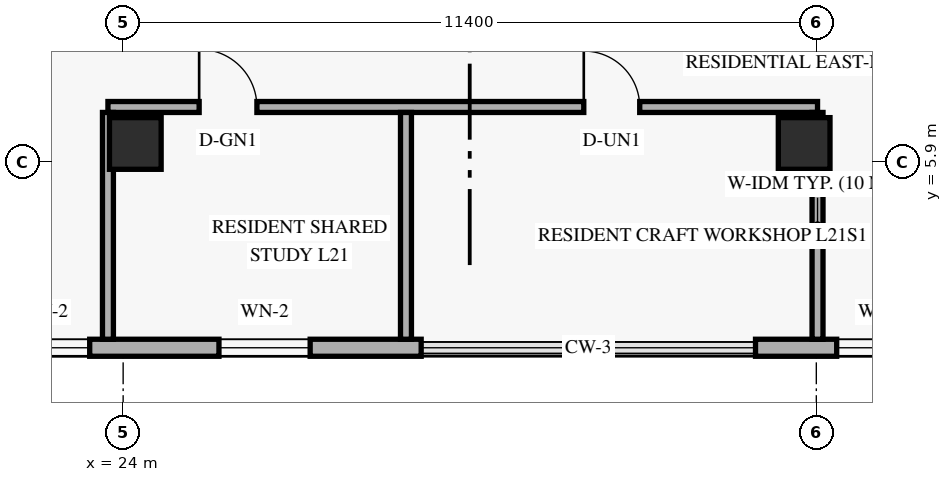
"""IFC4 building model, lengths in metres.
Left out: names, types, materials, properties, quantities, classifications, styles, units other than length and angle.
Written with IfcOpenShell. Run it as: python <this file> out.ifc"""

import sys

from ifc_helpers import new_model, si_unit, direction, frame, frame_2d, origin, origin_2d, place, context, subcontext, project, spatial, rectangle, extrude, element, fill, save


model = new_model("IFC4")
c1 = context("Model", 3, precision=1e-05, world=origin(), true_north=direction((0.0, 1.0)))
c2 = subcontext(c1, "Body", "Model", "MODEL_VIEW")
j1 = project(units=[si_unit("LENGTHUNIT", "METRE"), si_unit("PLANEANGLEUNIT", "RADIAN")], contexts=[c1])
p1 = place(None, origin())
s1 = spatial("IfcSite", under=j1, at=p1, CompositionType="ELEMENT")
p2 = place(p1, origin())
s2 = spatial("IfcBuilding", under=s1, at=p2, CompositionType="ELEMENT")
p3 = place(p2, frame((0.0, 0.0, 84.0)))
s3 = spatial("IfcBuildingStorey", under=s2, at=p3, CompositionType="ELEMENT", Elevation=84.0)
for number, where, z_axis, x_axis in (
    (1, (24.2, 6.2, 0.0), (0.0, 0.0, 1.0), (1.0, 0.0, 0.0)),
    (2, (35.2, 6.2, 0.0), (0.0, 0.0, 1.0), (1.0, 0.0, 0.0)),
):
    element("IfcColumn", number, at=place(p3, frame(where, z_axis=z_axis, x_axis=x_axis)), inside=s3, PredefinedType="COLUMN", context=c2, shape_type="SweptSolid", body=[
        extrude(rectangle(XDim=0.85, YDim=0.85, at=origin_2d()), origin(), (0.0, 0.0, 1.0), 3.6),
    ])
p4 = place(p3, frame((13.42, 2.84, 0.0), z_axis=(0.0, 0.0, 1.0), x_axis=(1.0, 0.0, 0.0)))
e3 = element("IfcWall", 3, at=p4, inside=s3, PredefinedType="SOLIDWALL", context=c2, shape_type="SweptSolid", body=[
    extrude(rectangle(XDim=15.481, YDim=0.28, at=frame_2d((7.741, 0.0))), origin(), (0.0, 0.0, 1.0), 3.36),
])
p5 = place(p4, frame((3.365, 0.0, 0.85)))
e4 = element("IfcOpeningElement", 4, at=p5, cuts=e3, PredefinedType="OPENING", context=c2, shape_type="SweptSolid", body=[
    extrude(rectangle(XDim=1.5, YDim=1.55, at=frame_2d((0.75, 0.775))), frame((0.0, 0.15, 0.0), z_axis=(0.0, -1.0, 0.0), x_axis=(1.0, 0.0, 0.0)), (0.0, 0.0, 1.0), 0.3),
])
p6 = place(p4, frame((8.53, 0.0, 0.85)))
e5 = element("IfcOpeningElement", 5, at=p6, cuts=e3, PredefinedType="OPENING", context=c2, shape_type="SweptSolid", body=[
    extrude(rectangle(XDim=1.5, YDim=1.55, at=frame_2d((0.75, 0.775))), frame((0.0, 0.15, 0.0), z_axis=(0.0, -1.0, 0.0), x_axis=(1.0, 0.0, 0.0)), (0.0, 0.0, 1.0), 0.3),
])
p7 = place(p4, frame((12.156, 0.0, 0.85)))
e6 = element("IfcOpeningElement", 6, at=p7, cuts=e3, PredefinedType="OPENING", context=c2, shape_type="SweptSolid", body=[
    extrude(rectangle(XDim=1.5, YDim=1.55, at=frame_2d((0.75, 0.775))), frame((0.0, 0.15, 0.0), z_axis=(0.0, -1.0, 0.0), x_axis=(1.0, 0.0, 0.0)), (0.0, 0.0, 1.0), 0.3),
])
p8 = place(p3, frame((34.4, 2.84, 0.0), z_axis=(0.0, 0.0, 1.0), x_axis=(1.0, 0.0, 0.0)))
e7 = element("IfcWall", 7, at=p8, inside=s3, PredefinedType="SOLIDWALL", context=c2, shape_type="SweptSolid", body=[
    extrude(rectangle(XDim=15.58, YDim=0.28, at=frame_2d((7.79, 0.0))), origin(), (0.0, 0.0, 1.0), 3.36),
])
p9 = place(p8, frame((1.335, 0.0, 0.85)))
e8 = element("IfcOpeningElement", 8, at=p9, cuts=e7, PredefinedType="OPENING", context=c2, shape_type="SweptSolid", body=[
    extrude(rectangle(XDim=1.5, YDim=1.55, at=frame_2d((0.75, 0.775))), frame((0.0, 0.15, 0.0), z_axis=(0.0, -1.0, 0.0), x_axis=(1.0, 0.0, 0.0)), (0.0, 0.0, 1.0), 0.3),
])
p10 = place(p8, frame((8.615, 0.0, 0.85)))
e9 = element("IfcOpeningElement", 9, at=p10, cuts=e7, PredefinedType="OPENING", context=c2, shape_type="SweptSolid", body=[
    extrude(rectangle(XDim=1.5, YDim=1.55, at=frame_2d((0.75, 0.775))), frame((0.0, 0.15, 0.0), z_axis=(0.0, -1.0, 0.0), x_axis=(1.0, 0.0, 0.0)), (0.0, 0.0, 1.0), 0.3),
])
p11 = place(p3, frame((23.75, 6.8, 0.0), z_axis=(0.0, 0.0, 1.0), x_axis=(1.0, 0.0, 0.0)))
e10 = element("IfcWall", 10, at=p11, inside=s3, PredefinedType="STANDARD", context=c2, shape_type="SweptSolid", body=[
    extrude(rectangle(XDim=11.67, YDim=0.18, at=frame_2d((5.835, 0.0))), origin(), (0.0, 0.0, 1.0), 2.731),
])
p12 = place(p11, frame((1.5, 0.0, 0.0)))
e11 = element("IfcOpeningElement", 11, at=p12, cuts=e10, PredefinedType="OPENING", context=c2, shape_type="SweptSolid", body=[
    extrude(rectangle(XDim=0.95, YDim=2.15, at=frame_2d((0.475, 1.075))), frame((0.0, 0.1, 0.0), z_axis=(0.0, -1.0, 0.0), x_axis=(1.0, 0.0, 0.0)), (0.0, 0.0, 1.0), 0.2),
])
p13 = place(p11, frame((7.826, 0.0, 0.0)))
e12 = element("IfcOpeningElement", 12, at=p13, cuts=e10, PredefinedType="OPENING", context=c2, shape_type="SweptSolid", body=[
    extrude(rectangle(XDim=0.92, YDim=2.15, at=frame_2d((0.46, 1.075))), frame((0.0, 0.1, 0.0), z_axis=(0.0, -1.0, 0.0), x_axis=(1.0, 0.0, 0.0)), (0.0, 0.0, 1.0), 0.2),
])
p14 = place(p3, frame((35.42, 2.98, 0.0), z_axis=(0.0, 0.0, 1.0), x_axis=(0.0, 1.0, 0.0)))
e13 = element("IfcWall", 13, at=p14, inside=s3, PredefinedType="PARTITIONING", context=c2, shape_type="SweptSolid", body=[
    extrude(rectangle(XDim=3.73, YDim=0.18, at=frame_2d((1.865, 0.0))), origin(), (0.0, 0.0, 1.0), 2.731),
])
for number, where, z_axis, x_axis in (
    (14, (23.75, 2.98, 0.0), (0.0, 0.0, 1.0), (0.0, 1.0, 0.0)),
    (15, (28.651, 2.98, 0.0), (0.0, 0.0, 1.0), (0.0, 1.0, 0.0)),
):
    element("IfcWall", number, at=place(p3, frame(where, z_axis=z_axis, x_axis=x_axis)), inside=s3, PredefinedType="PARTITIONING", context=c2, shape_type="SweptSolid", body=[
        extrude(rectangle(XDim=3.73, YDim=0.18, at=frame_2d((1.865, 0.0))), origin(), (0.0, 0.0, 1.0), 2.809),
    ])
p15 = place(p6, origin())
e16 = element("IfcWindow", 16, at=p15, inside=s3, PartitioningType="SINGLE_PANEL", PredefinedType="WINDOW", context=c2, shape_type="SweptSolid", body=[
    extrude(rectangle(XDim=1.5, YDim=1.55, at=frame_2d((0.75, 0.775))), frame((0.0, 0.03, 0.0), z_axis=(0.0, -1.0, 0.0), x_axis=(1.0, 0.0, 0.0)), (0.0, 0.0, 1.0), 0.06),
])
fill(e5, e16)
p16 = place(p7, origin())
e17 = element("IfcWindow", 17, at=p16, inside=s3, PartitioningType="SINGLE_PANEL", PredefinedType="WINDOW", context=c2, shape_type="SweptSolid", body=[
    extrude(rectangle(XDim=1.5, YDim=1.55, at=frame_2d((0.75, 0.775))), frame((0.0, 0.03, 0.0), z_axis=(0.0, -1.0, 0.0), x_axis=(1.0, 0.0, 0.0)), (0.0, 0.0, 1.0), 0.06),
])
fill(e6, e17)
p17 = place(p9, origin())
e18 = element("IfcWindow", 18, at=p17, inside=s3, PartitioningType="SINGLE_PANEL", PredefinedType="WINDOW", context=c2, shape_type="SweptSolid", body=[
    extrude(rectangle(XDim=1.5, YDim=1.55, at=frame_2d((0.75, 0.775))), frame((0.0, 0.03, 0.0), z_axis=(0.0, -1.0, 0.0), x_axis=(1.0, 0.0, 0.0)), (0.0, 0.0, 1.0), 0.06),
])
fill(e8, e18)
p18 = place(p12, origin())
e19 = element("IfcDoor", 19, at=p18, inside=s3, OperationType="SINGLE_SWING_LEFT", PredefinedType="DOOR", context=c2, shape_type="SweptSolid", body=[
    extrude(rectangle(XDim=0.95, YDim=2.15, at=frame_2d((0.475, 1.075))), frame((0.0, 0.025, 0.0), z_axis=(0.0, -1.0, 0.0), x_axis=(1.0, 0.0, 0.0)), (0.0, 0.0, 1.0), 0.05),
])
fill(e11, e19)
p19 = place(p13, origin())
e20 = element("IfcDoor", 20, at=p19, inside=s3, OperationType="SINGLE_SWING_LEFT", PredefinedType="DOOR", context=c2, shape_type="SweptSolid", body=[
    extrude(rectangle(XDim=0.92, YDim=2.15, at=frame_2d((0.46, 1.075))), frame((0.0, 0.025, 0.0), z_axis=(0.0, -1.0, 0.0), x_axis=(1.0, 0.0, 0.0)), (0.0, 0.0, 1.0), 0.05),
])
fill(e12, e20)
save(model, sys.argv[1])
